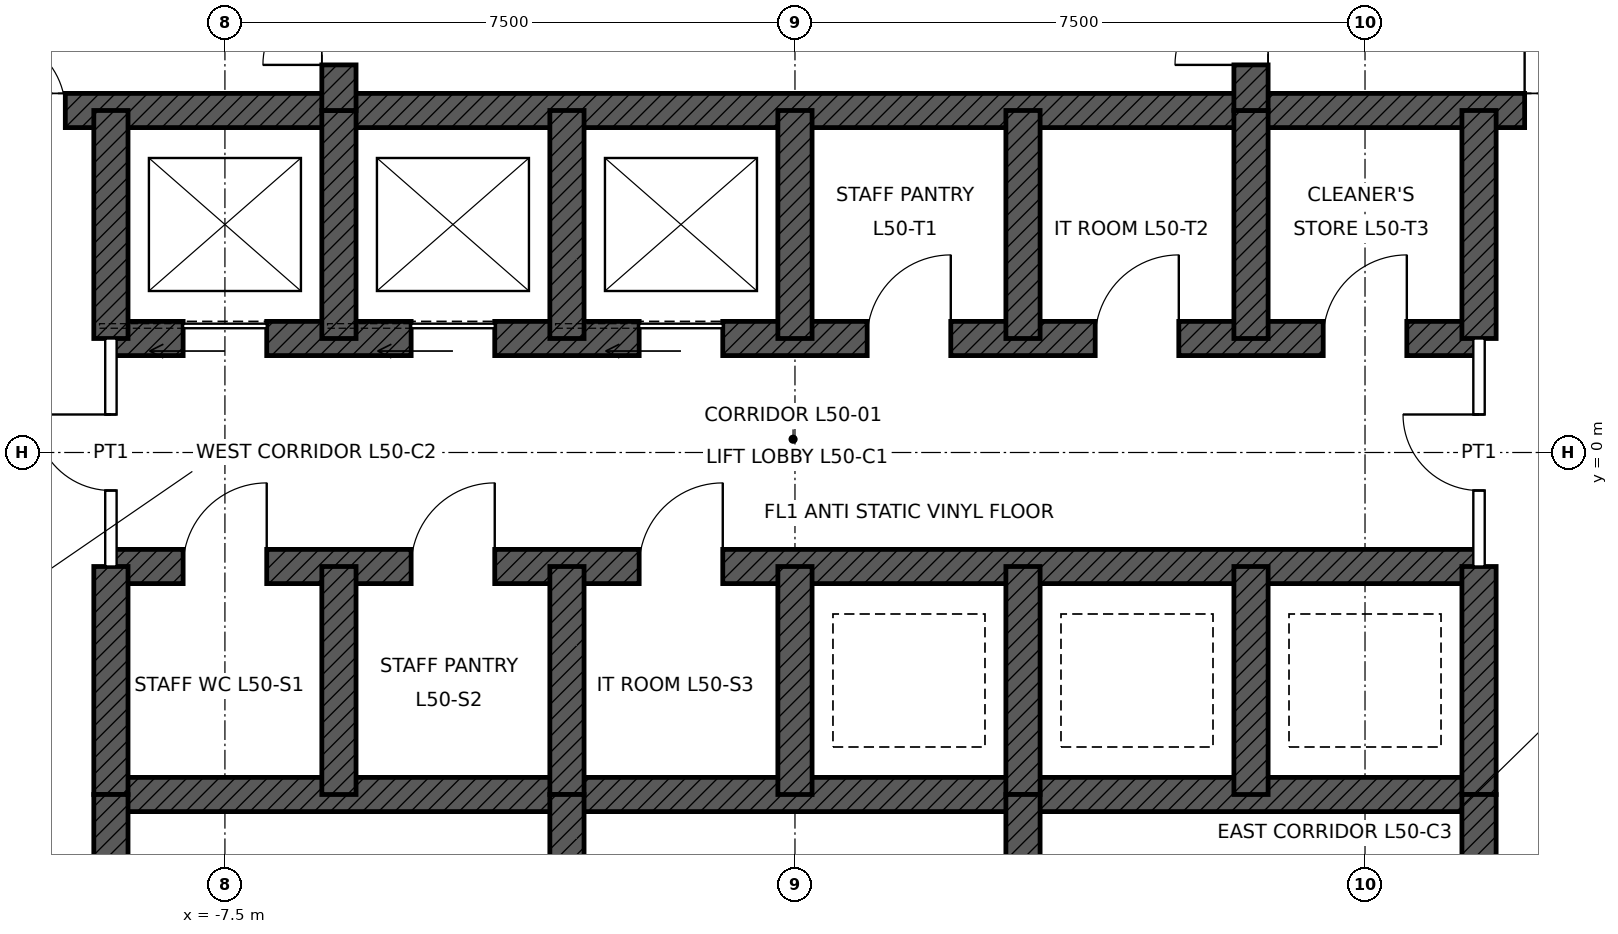
"""IFC4 building model, lengths in metres.
Left out: names, types, materials, properties, quantities, classifications, styles, units other than length and angle.
Written with IfcOpenShell. Run it as: python <this file> out.ifc"""

import sys

from ifc_helpers import new_model, si_unit, direction, frame, frame_2d, origin, place, context, subcontext, project, spatial, rectangle, extrude, element, fill, save


model = new_model("IFC4")
c1 = context("Model", 3, precision=1e-05, world=origin(), true_north=direction((0.0, 1.0)))
c2 = subcontext(c1, "Body", "Model", "MODEL_VIEW")
j1 = project(units=[si_unit("LENGTHUNIT", "METRE"), si_unit("PLANEANGLEUNIT", "RADIAN")], contexts=[c1])
p1 = place(None, origin())
s1 = spatial("IfcSite", under=j1, at=p1, CompositionType="ELEMENT")
p2 = place(p1, origin())
s2 = spatial("IfcBuilding", under=s1, at=p2, CompositionType="ELEMENT")
p3 = place(p2, frame((0.0, 0.0, 233.9)))
s3 = spatial("IfcBuildingStorey", under=s2, at=p3, CompositionType="ELEMENT", Elevation=233.9)
p4 = place(p3, frame((-11.0, 4.5, 0.0), z_axis=(0.0, 0.0, 1.0), x_axis=(1.0, 0.0, 0.0)))
e1 = element("IfcWall", 1, at=p4, inside=s3, PredefinedType="SHEAR", context=c2, shape_type="SweptSolid", body=[
    extrude(rectangle(XDim=22.0, YDim=0.45, at=frame_2d((11.0, 0.0))), origin(), (0.0, 0.0, 1.0), 4.0),
])
p5 = place(p4, frame((0.4, 0.0, 0.0)))
e2 = element("IfcOpeningElement", 2, at=p5, cuts=e1, PredefinedType="OPENING", context=c2, shape_type="SweptSolid", body=[
    extrude(rectangle(XDim=1.0, YDim=2.1, at=frame_2d((0.5, 1.05))), frame((0.0, 0.235, 0.0), z_axis=(0.0, -1.0, 0.0), x_axis=(1.0, 0.0, 0.0)), (0.0, 0.0, 1.0), 0.47),
])
p6 = place(p4, frame((20.6, 0.0, 0.0)))
e3 = element("IfcOpeningElement", 3, at=p6, cuts=e1, PredefinedType="OPENING", context=c2, shape_type="SweptSolid", body=[
    extrude(rectangle(XDim=1.0, YDim=2.1, at=frame_2d((0.5, 1.05))), frame((0.0, 0.235, 0.0), z_axis=(0.0, -1.0, 0.0), x_axis=(1.0, 0.0, 0.0)), (0.0, 0.0, 1.0), 0.47),
])
p7 = place(p3, frame((-9.0, 1.5, 0.0), z_axis=(0.0, 0.0, 1.0), x_axis=(1.0, 0.0, 0.0)))
e4 = element("IfcWall", 4, at=p7, inside=s3, PredefinedType="SHEAR", context=c2, shape_type="SweptSolid", body=[
    extrude(rectangle(XDim=18.0, YDim=0.45, at=frame_2d((9.0, 0.0))), origin(), (0.0, 0.0, 1.0), 4.0),
])
p8 = place(p7, frame((0.95, 0.0, 0.0)))
e5 = element("IfcOpeningElement", 5, at=p8, cuts=e4, PredefinedType="OPENING", context=c2, shape_type="SweptSolid", body=[
    extrude(rectangle(XDim=1.1, YDim=2.1, at=frame_2d((0.55, 1.05))), frame((0.0, 0.235, 0.0), z_axis=(0.0, -1.0, 0.0), x_axis=(1.0, 0.0, 0.0)), (0.0, 0.0, 1.0), 0.47),
])
p9 = place(p7, frame((3.95, 0.0, 0.0)))
e6 = element("IfcOpeningElement", 6, at=p9, cuts=e4, PredefinedType="OPENING", context=c2, shape_type="SweptSolid", body=[
    extrude(rectangle(XDim=1.1, YDim=2.1, at=frame_2d((0.55, 1.05))), frame((0.0, 0.235, 0.0), z_axis=(0.0, -1.0, 0.0), x_axis=(1.0, 0.0, 0.0)), (0.0, 0.0, 1.0), 0.47),
])
p10 = place(p7, frame((6.95, 0.0, 0.0)))
e7 = element("IfcOpeningElement", 7, at=p10, cuts=e4, PredefinedType="OPENING", context=c2, shape_type="SweptSolid", body=[
    extrude(rectangle(XDim=1.1, YDim=2.1, at=frame_2d((0.55, 1.05))), frame((0.0, 0.235, 0.0), z_axis=(0.0, -1.0, 0.0), x_axis=(1.0, 0.0, 0.0)), (0.0, 0.0, 1.0), 0.47),
])
p11 = place(p7, frame((9.95, 0.0, 0.0)))
e8 = element("IfcOpeningElement", 8, at=p11, cuts=e4, PredefinedType="OPENING", context=c2, shape_type="SweptSolid", body=[
    extrude(rectangle(XDim=1.1, YDim=2.1, at=frame_2d((0.55, 1.05))), frame((0.0, 0.235, 0.0), z_axis=(0.0, -1.0, 0.0), x_axis=(1.0, 0.0, 0.0)), (0.0, 0.0, 1.0), 0.47),
])
p12 = place(p7, frame((12.95, 0.0, 0.0)))
e9 = element("IfcOpeningElement", 9, at=p12, cuts=e4, PredefinedType="OPENING", context=c2, shape_type="SweptSolid", body=[
    extrude(rectangle(XDim=1.1, YDim=2.1, at=frame_2d((0.55, 1.05))), frame((0.0, 0.235, 0.0), z_axis=(0.0, -1.0, 0.0), x_axis=(1.0, 0.0, 0.0)), (0.0, 0.0, 1.0), 0.47),
])
p13 = place(p7, frame((15.95, 0.0, 0.0)))
e10 = element("IfcOpeningElement", 10, at=p13, cuts=e4, PredefinedType="OPENING", context=c2, shape_type="SweptSolid", body=[
    extrude(rectangle(XDim=1.1, YDim=2.1, at=frame_2d((0.55, 1.05))), frame((0.0, 0.235, 0.0), z_axis=(0.0, -1.0, 0.0), x_axis=(1.0, 0.0, 0.0)), (0.0, 0.0, 1.0), 0.47),
])
p14 = place(p3, frame((-9.0, -1.5, 0.0), z_axis=(0.0, 0.0, 1.0), x_axis=(1.0, 0.0, 0.0)))
e11 = element("IfcWall", 11, at=p14, inside=s3, PredefinedType="SHEAR", context=c2, shape_type="SweptSolid", body=[
    extrude(rectangle(XDim=18.0, YDim=0.45, at=frame_2d((9.0, 0.0))), origin(), (0.0, 0.0, 1.0), 4.0),
])
p15 = place(p14, frame((0.95, 0.0, 0.0)))
e12 = element("IfcOpeningElement", 12, at=p15, cuts=e11, PredefinedType="OPENING", context=c2, shape_type="SweptSolid", body=[
    extrude(rectangle(XDim=1.1, YDim=2.1, at=frame_2d((0.55, 1.05))), frame((0.0, 0.235, 0.0), z_axis=(0.0, -1.0, 0.0), x_axis=(1.0, 0.0, 0.0)), (0.0, 0.0, 1.0), 0.47),
])
p16 = place(p14, frame((3.95, 0.0, 0.0)))
e13 = element("IfcOpeningElement", 13, at=p16, cuts=e11, PredefinedType="OPENING", context=c2, shape_type="SweptSolid", body=[
    extrude(rectangle(XDim=1.1, YDim=2.1, at=frame_2d((0.55, 1.05))), frame((0.0, 0.235, 0.0), z_axis=(0.0, -1.0, 0.0), x_axis=(1.0, 0.0, 0.0)), (0.0, 0.0, 1.0), 0.47),
])
p17 = place(p14, frame((6.95, 0.0, 0.0)))
e14 = element("IfcOpeningElement", 14, at=p17, cuts=e11, PredefinedType="OPENING", context=c2, shape_type="SweptSolid", body=[
    extrude(rectangle(XDim=1.1, YDim=2.1, at=frame_2d((0.55, 1.05))), frame((0.0, 0.235, 0.0), z_axis=(0.0, -1.0, 0.0), x_axis=(1.0, 0.0, 0.0)), (0.0, 0.0, 1.0), 0.47),
])
p18 = place(p3, frame((-9.0, -4.5, 0.0), z_axis=(0.0, 0.0, 1.0), x_axis=(1.0, 0.0, 0.0)))
e15 = element("IfcWall", 15, at=p18, inside=s3, PredefinedType="SHEAR", context=c2, shape_type="SweptSolid", body=[
    extrude(rectangle(XDim=18.0, YDim=0.45, at=frame_2d((9.0, 0.0))), origin(), (0.0, 0.0, 1.0), 4.0),
])
for number, where, z_axis, x_axis in (
    (16, (-9.0, 1.5, 0.0), (0.0, 0.0, 1.0), (0.0, 1.0, 0.0)),
    (17, (9.0, 1.5, 0.0), (0.0, 0.0, 1.0), (0.0, 1.0, 0.0)),
    (18, (-9.0, -4.5, 0.0), (0.0, 0.0, 1.0), (0.0, 1.0, 0.0)),
    (19, (9.0, -4.5, 0.0), (0.0, 0.0, 1.0), (0.0, 1.0, 0.0)),
    (20, (-6.0, 1.5, 0.0), (0.0, 0.0, 1.0), (0.0, 1.0, 0.0)),
    (21, (-3.0, 1.5, 0.0), (0.0, 0.0, 1.0), (0.0, 1.0, 0.0)),
    (22, (0.0, 1.5, 0.0), (0.0, 0.0, 1.0), (0.0, 1.0, 0.0)),
    (23, (3.0, 1.5, 0.0), (0.0, 0.0, 1.0), (0.0, 1.0, 0.0)),
    (24, (6.0, 1.5, 0.0), (0.0, 0.0, 1.0), (0.0, 1.0, 0.0)),
    (25, (-6.0, -4.5, 0.0), (0.0, 0.0, 1.0), (0.0, 1.0, 0.0)),
    (26, (-3.0, -4.5, 0.0), (0.0, 0.0, 1.0), (0.0, 1.0, 0.0)),
    (27, (0.0, -4.5, 0.0), (0.0, 0.0, 1.0), (0.0, 1.0, 0.0)),
    (28, (3.0, -4.5, 0.0), (0.0, 0.0, 1.0), (0.0, 1.0, 0.0)),
    (29, (6.0, -4.5, 0.0), (0.0, 0.0, 1.0), (0.0, 1.0, 0.0)),
):
    element("IfcWall", number, at=place(p3, frame(where, z_axis=z_axis, x_axis=x_axis)), inside=s3, PredefinedType="SHEAR", context=c2, shape_type="SweptSolid", body=[
        extrude(rectangle(XDim=3.0, YDim=0.45, at=frame_2d((1.5, 0.0))), origin(), (0.0, 0.0, 1.0), 4.0),
    ])
p19 = place(p3, frame((-6.0, 4.5, 0.0), z_axis=(0.0, 0.0, 1.0), x_axis=(0.0, 1.0, 0.0)))
e30 = element("IfcWall", 30, at=p19, inside=s3, PredefinedType="SHEAR", context=c2, shape_type="SweptSolid", body=[
    extrude(rectangle(XDim=6.5, YDim=0.45, at=frame_2d((3.25, 0.0))), origin(), (0.0, 0.0, 1.0), 4.0),
])
p20 = place(p19, frame((0.6, 0.0, 0.0)))
e31 = element("IfcOpeningElement", 31, at=p20, cuts=e30, PredefinedType="OPENING", context=c2, shape_type="SweptSolid", body=[
    extrude(rectangle(XDim=1.0, YDim=2.1, at=frame_2d((0.5, 1.05))), frame((0.0, 0.235, 0.0), z_axis=(0.0, -1.0, 0.0), x_axis=(1.0, 0.0, 0.0)), (0.0, 0.0, 1.0), 0.47),
])
p21 = place(p3, frame((6.0, 4.5, 0.0), z_axis=(0.0, 0.0, 1.0), x_axis=(0.0, 1.0, 0.0)))
e32 = element("IfcWall", 32, at=p21, inside=s3, PredefinedType="SHEAR", context=c2, shape_type="SweptSolid", body=[
    extrude(rectangle(XDim=6.5, YDim=0.45, at=frame_2d((3.25, 0.0))), origin(), (0.0, 0.0, 1.0), 4.0),
])
p22 = place(p21, frame((0.6, 0.0, 0.0)))
e33 = element("IfcOpeningElement", 33, at=p22, cuts=e32, PredefinedType="OPENING", context=c2, shape_type="SweptSolid", body=[
    extrude(rectangle(XDim=1.0, YDim=2.1, at=frame_2d((0.5, 1.05))), frame((0.0, 0.235, 0.0), z_axis=(0.0, -1.0, 0.0), x_axis=(1.0, 0.0, 0.0)), (0.0, 0.0, 1.0), 0.47),
])
p23 = place(p3, frame((-9.0, -11.0, 0.0), z_axis=(0.0, 0.0, 1.0), x_axis=(0.0, 1.0, 0.0)))
e34 = element("IfcWall", 34, at=p23, inside=s3, PredefinedType="SHEAR", context=c2, shape_type="SweptSolid", body=[
    extrude(rectangle(XDim=6.5, YDim=0.45, at=frame_2d((3.25, 0.0))), origin(), (0.0, 0.0, 1.0), 4.0),
])
p24 = place(p23, frame((4.25, 0.0, 0.0)))
e35 = element("IfcOpeningElement", 35, at=p24, cuts=e34, PredefinedType="OPENING", context=c2, shape_type="SweptSolid", body=[
    extrude(rectangle(XDim=1.0, YDim=2.1, at=frame_2d((0.5, 1.05))), frame((0.0, 0.235, 0.0), z_axis=(0.0, -1.0, 0.0), x_axis=(1.0, 0.0, 0.0)), (0.0, 0.0, 1.0), 0.47),
])
p25 = place(p3, frame((9.0, -11.0, 0.0), z_axis=(0.0, 0.0, 1.0), x_axis=(0.0, 1.0, 0.0)))
e36 = element("IfcWall", 36, at=p25, inside=s3, PredefinedType="SHEAR", context=c2, shape_type="SweptSolid", body=[
    extrude(rectangle(XDim=6.5, YDim=0.45, at=frame_2d((3.25, 0.0))), origin(), (0.0, 0.0, 1.0), 4.0),
])
p26 = place(p25, frame((4.25, 0.0, 0.0)))
e37 = element("IfcOpeningElement", 37, at=p26, cuts=e36, PredefinedType="OPENING", context=c2, shape_type="SweptSolid", body=[
    extrude(rectangle(XDim=1.0, YDim=2.1, at=frame_2d((0.5, 1.05))), frame((0.0, 0.235, 0.0), z_axis=(0.0, -1.0, 0.0), x_axis=(1.0, 0.0, 0.0)), (0.0, 0.0, 1.0), 0.47),
])
for number, where, z_axis, x_axis in (
    (38, (-3.0, -11.0, 0.0), (0.0, 0.0, 1.0), (0.0, 1.0, 0.0)),
    (39, (3.0, -11.0, 0.0), (0.0, 0.0, 1.0), (0.0, 1.0, 0.0)),
):
    element("IfcWall", number, at=place(p3, frame(where, z_axis=z_axis, x_axis=x_axis)), inside=s3, PredefinedType="SHEAR", context=c2, shape_type="SweptSolid", body=[
        extrude(rectangle(XDim=6.5, YDim=0.45, at=frame_2d((3.25, 0.0))), origin(), (0.0, 0.0, 1.0), 4.0),
    ])
p27 = place(p3, frame((-9.0, -1.5, 0.0), z_axis=(0.0, 0.0, 1.0), x_axis=(0.0, 1.0, 0.0)))
e40 = element("IfcWall", 40, at=p27, inside=s3, PredefinedType="PARTITIONING", context=c2, shape_type="SweptSolid", body=[
    extrude(rectangle(XDim=3.0, YDim=0.15, at=frame_2d((1.5, 0.0))), origin(), (0.0, 0.0, 1.0), 3.75),
])
p28 = place(p27, frame((1.0, 0.0, 0.0)))
e41 = element("IfcOpeningElement", 41, at=p28, cuts=e40, PredefinedType="OPENING", context=c2, shape_type="SweptSolid", body=[
    extrude(rectangle(XDim=1.0, YDim=2.4, at=frame_2d((0.5, 1.2))), frame((0.0, 0.085, 0.0), z_axis=(0.0, -1.0, 0.0), x_axis=(1.0, 0.0, 0.0)), (0.0, 0.0, 1.0), 0.17),
])
p29 = place(p3, frame((9.0, -1.5, 0.0), z_axis=(0.0, 0.0, 1.0), x_axis=(0.0, 1.0, 0.0)))
e42 = element("IfcWall", 42, at=p29, inside=s3, PredefinedType="PARTITIONING", context=c2, shape_type="SweptSolid", body=[
    extrude(rectangle(XDim=3.0, YDim=0.15, at=frame_2d((1.5, 0.0))), origin(), (0.0, 0.0, 1.0), 3.75),
])
p30 = place(p29, frame((1.0, 0.0, 0.0)))
e43 = element("IfcOpeningElement", 43, at=p30, cuts=e42, PredefinedType="OPENING", context=c2, shape_type="SweptSolid", body=[
    extrude(rectangle(XDim=1.0, YDim=2.4, at=frame_2d((0.5, 1.2))), frame((0.0, 0.085, 0.0), z_axis=(0.0, -1.0, 0.0), x_axis=(1.0, 0.0, 0.0)), (0.0, 0.0, 1.0), 0.17),
])
p31 = place(p5, origin())
e44 = element("IfcDoor", 44, at=p31, inside=s3, OperationType="SINGLE_SWING_LEFT", PredefinedType="DOOR", context=c2, shape_type="SweptSolid", body=[
    extrude(rectangle(XDim=1.0, YDim=2.1, at=frame_2d((0.5, 1.05))), frame((0.0, 0.025, 0.0), z_axis=(0.0, -1.0, 0.0), x_axis=(1.0, 0.0, 0.0)), (0.0, 0.0, 1.0), 0.05),
])
fill(e2, e44)
p32 = place(p6, origin())
e45 = element("IfcDoor", 45, at=p32, inside=s3, OperationType="SINGLE_SWING_LEFT", PredefinedType="DOOR", context=c2, shape_type="SweptSolid", body=[
    extrude(rectangle(XDim=1.0, YDim=2.1, at=frame_2d((0.5, 1.05))), frame((0.0, 0.025, 0.0), z_axis=(0.0, -1.0, 0.0), x_axis=(1.0, 0.0, 0.0)), (0.0, 0.0, 1.0), 0.05),
])
fill(e3, e45)
p33 = place(p20, origin())
e46 = element("IfcDoor", 46, at=p33, inside=s3, OperationType="SINGLE_SWING_LEFT", PredefinedType="DOOR", context=c2, shape_type="SweptSolid", body=[
    extrude(rectangle(XDim=1.0, YDim=2.1, at=frame_2d((0.5, 1.05))), frame((0.0, 0.025, 0.0), z_axis=(0.0, -1.0, 0.0), x_axis=(1.0, 0.0, 0.0)), (0.0, 0.0, 1.0), 0.05),
])
fill(e31, e46)
p34 = place(p22, origin())
e47 = element("IfcDoor", 47, at=p34, inside=s3, OperationType="SINGLE_SWING_LEFT", PredefinedType="DOOR", context=c2, shape_type="SweptSolid", body=[
    extrude(rectangle(XDim=1.0, YDim=2.1, at=frame_2d((0.5, 1.05))), frame((0.0, 0.025, 0.0), z_axis=(0.0, -1.0, 0.0), x_axis=(1.0, 0.0, 0.0)), (0.0, 0.0, 1.0), 0.05),
])
fill(e33, e47)
p35 = place(p8, origin())
e48 = element("IfcDoor", 48, at=p35, inside=s3, OperationType="SLIDING_TO_LEFT", PredefinedType="DOOR", context=c2, shape_type="SweptSolid", body=[
    extrude(rectangle(XDim=1.1, YDim=2.1, at=frame_2d((0.55, 1.05))), frame((0.0, 0.025, 0.0), z_axis=(0.0, -1.0, 0.0), x_axis=(1.0, 0.0, 0.0)), (0.0, 0.0, 1.0), 0.05),
])
fill(e5, e48)
p36 = place(p9, origin())
e49 = element("IfcDoor", 49, at=p36, inside=s3, OperationType="SLIDING_TO_LEFT", PredefinedType="DOOR", context=c2, shape_type="SweptSolid", body=[
    extrude(rectangle(XDim=1.1, YDim=2.1, at=frame_2d((0.55, 1.05))), frame((0.0, 0.025, 0.0), z_axis=(0.0, -1.0, 0.0), x_axis=(1.0, 0.0, 0.0)), (0.0, 0.0, 1.0), 0.05),
])
fill(e6, e49)
p37 = place(p10, origin())
e50 = element("IfcDoor", 50, at=p37, inside=s3, OperationType="SLIDING_TO_LEFT", PredefinedType="DOOR", context=c2, shape_type="SweptSolid", body=[
    extrude(rectangle(XDim=1.1, YDim=2.1, at=frame_2d((0.55, 1.05))), frame((0.0, 0.025, 0.0), z_axis=(0.0, -1.0, 0.0), x_axis=(1.0, 0.0, 0.0)), (0.0, 0.0, 1.0), 0.05),
])
fill(e7, e50)
p38 = place(p28, origin())
e51 = element("IfcDoor", 51, at=p38, inside=s3, OperationType="SINGLE_SWING_RIGHT", PredefinedType="DOOR", context=c2, shape_type="SweptSolid", body=[
    extrude(rectangle(XDim=1.0, YDim=2.4, at=frame_2d((0.5, 1.2))), frame((0.0, 0.025, 0.0), z_axis=(0.0, -1.0, 0.0), x_axis=(1.0, 0.0, 0.0)), (0.0, 0.0, 1.0), 0.05),
])
fill(e41, e51)
p39 = place(p30, origin())
e52 = element("IfcDoor", 52, at=p39, inside=s3, OperationType="SINGLE_SWING_RIGHT", PredefinedType="DOOR", context=c2, shape_type="SweptSolid", body=[
    extrude(rectangle(XDim=1.0, YDim=2.4, at=frame_2d((0.5, 1.2))), frame((0.0, 0.025, 0.0), z_axis=(0.0, -1.0, 0.0), x_axis=(1.0, 0.0, 0.0)), (0.0, 0.0, 1.0), 0.05),
])
fill(e43, e52)
p40 = place(p11, origin())
e53 = element("IfcDoor", 53, at=p40, inside=s3, OperationType="SINGLE_SWING_RIGHT", PredefinedType="DOOR", context=c2, shape_type="SweptSolid", body=[
    extrude(rectangle(XDim=1.1, YDim=2.1, at=frame_2d((0.55, 1.05))), frame((0.0, 0.025, 0.0), z_axis=(0.0, -1.0, 0.0), x_axis=(1.0, 0.0, 0.0)), (0.0, 0.0, 1.0), 0.05),
])
fill(e8, e53)
p41 = place(p12, origin())
e54 = element("IfcDoor", 54, at=p41, inside=s3, OperationType="SINGLE_SWING_RIGHT", PredefinedType="DOOR", context=c2, shape_type="SweptSolid", body=[
    extrude(rectangle(XDim=1.1, YDim=2.1, at=frame_2d((0.55, 1.05))), frame((0.0, 0.025, 0.0), z_axis=(0.0, -1.0, 0.0), x_axis=(1.0, 0.0, 0.0)), (0.0, 0.0, 1.0), 0.05),
])
fill(e9, e54)
p42 = place(p13, origin())
e55 = element("IfcDoor", 55, at=p42, inside=s3, OperationType="SINGLE_SWING_RIGHT", PredefinedType="DOOR", context=c2, shape_type="SweptSolid", body=[
    extrude(rectangle(XDim=1.1, YDim=2.1, at=frame_2d((0.55, 1.05))), frame((0.0, 0.025, 0.0), z_axis=(0.0, -1.0, 0.0), x_axis=(1.0, 0.0, 0.0)), (0.0, 0.0, 1.0), 0.05),
])
fill(e10, e55)
p43 = place(p15, origin())
e56 = element("IfcDoor", 56, at=p43, inside=s3, OperationType="SINGLE_SWING_RIGHT", PredefinedType="DOOR", context=c2, shape_type="SweptSolid", body=[
    extrude(rectangle(XDim=1.1, YDim=2.1, at=frame_2d((0.55, 1.05))), frame((0.0, 0.025, 0.0), z_axis=(0.0, -1.0, 0.0), x_axis=(1.0, 0.0, 0.0)), (0.0, 0.0, 1.0), 0.05),
])
fill(e12, e56)
p44 = place(p16, origin())
e57 = element("IfcDoor", 57, at=p44, inside=s3, OperationType="SINGLE_SWING_RIGHT", PredefinedType="DOOR", context=c2, shape_type="SweptSolid", body=[
    extrude(rectangle(XDim=1.1, YDim=2.1, at=frame_2d((0.55, 1.05))), frame((0.0, 0.025, 0.0), z_axis=(0.0, -1.0, 0.0), x_axis=(1.0, 0.0, 0.0)), (0.0, 0.0, 1.0), 0.05),
])
fill(e13, e57)
p45 = place(p17, origin())
e58 = element("IfcDoor", 58, at=p45, inside=s3, OperationType="SINGLE_SWING_RIGHT", PredefinedType="DOOR", context=c2, shape_type="SweptSolid", body=[
    extrude(rectangle(XDim=1.1, YDim=2.1, at=frame_2d((0.55, 1.05))), frame((0.0, 0.025, 0.0), z_axis=(0.0, -1.0, 0.0), x_axis=(1.0, 0.0, 0.0)), (0.0, 0.0, 1.0), 0.05),
])
fill(e14, e58)
save(model, sys.argv[1])
